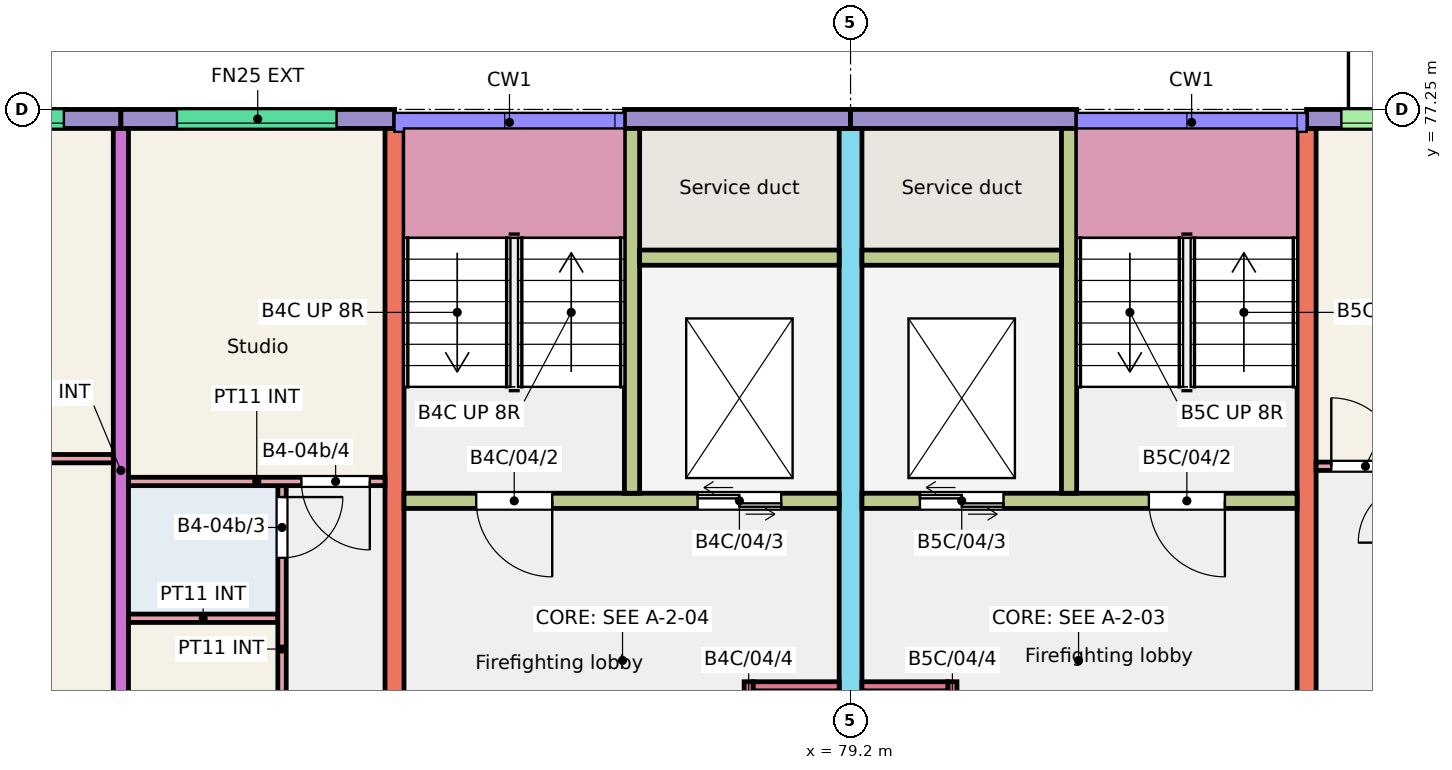
"""IFC4 building model, lengths in metres.
Left out: names, types, materials, properties, quantities, classifications, styles, units other than length and angle.
Written with IfcOpenShell. Run it as: python <this file> out.ifc"""

import sys

from ifc_helpers import new_model, si_unit, direction, frame, frame_2d, origin, place, context, subcontext, project, spatial, rectangle, extrude, element, fill, save


model = new_model("IFC4")
c1 = context("Model", 3, precision=1e-05, world=origin(), true_north=direction((0.0, 1.0)))
c2 = subcontext(c1, "Body", "Model", "MODEL_VIEW")
j1 = project(units=[si_unit("LENGTHUNIT", "METRE"), si_unit("PLANEANGLEUNIT", "RADIAN")], contexts=[c1])
p1 = place(None, origin())
s1 = spatial("IfcSite", under=j1, at=p1, CompositionType="ELEMENT")
p2 = place(p1, origin())
s2 = spatial("IfcBuilding", under=s1, at=p2, CompositionType="ELEMENT")
p3 = place(p2, frame((0.0, 0.0, 12.0)))
s3 = spatial("IfcBuildingStorey", under=s2, at=p3, CompositionType="ELEMENT", Elevation=12.0)
p4 = place(p3, frame((69.6, 68.0, 0.0), z_axis=(0.0, 0.0, 1.0), x_axis=(0.0, 1.0, 0.0)))
e1 = element("IfcWall", 1, at=p4, inside=s3, PredefinedType="SHEAR", context=c2, shape_type="SweptSolid", body=[
    extrude(rectangle(XDim=9.0, YDim=0.2, at=frame_2d((4.5, 0.0))), origin(), (0.0, 0.0, 1.0), 3.0),
])
p5 = place(p3, frame((73.2, 68.0, 0.0), z_axis=(0.0, 0.0, 1.0), x_axis=(0.0, 1.0, 0.0)))
e2 = element("IfcWall", 2, at=p5, inside=s3, PredefinedType="SHEAR", context=c2, shape_type="SweptSolid", body=[
    extrude(rectangle(XDim=9.0, YDim=0.25, at=frame_2d((4.5, 0.0))), origin(), (0.0, 0.0, 1.0), 3.0),
])
p6 = place(p3, frame((79.2, 66.0, 0.0), z_axis=(0.0, 0.0, 1.0), x_axis=(0.0, 1.0, 0.0)))
e3 = element("IfcWall", 3, at=p6, inside=s3, PredefinedType="SHEAR", context=c2, shape_type="SweptSolid", body=[
    extrude(rectangle(XDim=11.0, YDim=0.3, at=frame_2d((5.5, 0.0))), origin(), (0.0, 0.0, 1.0), 3.0),
])
p7 = place(p6, frame((0.3, 0.0, 0.0)))
e4 = element("IfcOpeningElement", 4, at=p7, cuts=e3, PredefinedType="OPENING", context=c2, shape_type="SweptSolid", body=[
    extrude(rectangle(XDim=1.2, YDim=2.1, at=frame_2d((0.6, 1.05))), frame((0.0, 0.16, 0.0), z_axis=(0.0, -1.0, 0.0), x_axis=(1.0, 0.0, 0.0)), (0.0, 0.0, 1.0), 0.32),
])
p8 = place(p3, frame((85.2, 68.0, 0.0), z_axis=(0.0, 0.0, 1.0), x_axis=(0.0, 1.0, 0.0)))
e5 = element("IfcWall", 5, at=p8, inside=s3, PredefinedType="SHEAR", context=c2, shape_type="SweptSolid", body=[
    extrude(rectangle(XDim=9.0, YDim=0.25, at=frame_2d((4.5, 0.0))), origin(), (0.0, 0.0, 1.0), 3.0),
])
p9 = place(p3, frame((66.0, 77.125, 0.0), z_axis=(0.0, 0.0, 1.0), x_axis=(1.0, 0.0, 0.0)))
e6 = element("IfcWall", 6, at=p9, inside=s3, PredefinedType="SOLIDWALL", context=c2, shape_type="SweptSolid", body=[
    extrude(rectangle(XDim=3.6, YDim=0.25, at=frame_2d((1.8, 0.0))), origin(), (0.0, 0.0, 1.0), 3.0),
])
p10 = place(p9, frame((0.75, 0.0, 1.2)))
e7 = element("IfcOpeningElement", 7, at=p10, cuts=e6, PredefinedType="OPENING", context=c2, shape_type="SweptSolid", body=[
    extrude(rectangle(XDim=2.1, YDim=1.2, at=frame_2d((1.05, 0.6))), frame((0.0, 0.135, 0.0), z_axis=(0.0, -1.0, 0.0), x_axis=(1.0, 0.0, 0.0)), (0.0, 0.0, 1.0), 0.27),
])
p11 = place(p3, frame((69.6, 77.125, 0.0), z_axis=(0.0, 0.0, 1.0), x_axis=(1.0, 0.0, 0.0)))
e8 = element("IfcWall", 8, at=p11, inside=s3, PredefinedType="SOLIDWALL", context=c2, shape_type="SweptSolid", body=[
    extrude(rectangle(XDim=3.6, YDim=0.25, at=frame_2d((1.8, 0.0))), origin(), (0.0, 0.0, 1.0), 3.0),
])
p12 = place(p11, frame((0.738, 0.0, 1.2)))
e9 = element("IfcOpeningElement", 9, at=p12, cuts=e8, PredefinedType="OPENING", context=c2, shape_type="SweptSolid", body=[
    extrude(rectangle(XDim=2.1, YDim=1.2, at=frame_2d((1.05, 0.6))), frame((0.0, 0.135, 0.0), z_axis=(0.0, -1.0, 0.0), x_axis=(1.0, 0.0, 0.0)), (0.0, 0.0, 1.0), 0.27),
])
p13 = place(p3, frame((76.225, 77.125, 0.0), z_axis=(0.0, 0.0, 1.0), x_axis=(1.0, 0.0, 0.0)))
e10 = element("IfcWall", 10, at=p13, inside=s3, PredefinedType="SOLIDWALL", context=c2, shape_type="SweptSolid", body=[
    extrude(rectangle(XDim=2.975, YDim=0.25, at=frame_2d((1.487, 0.0))), origin(), (0.0, 0.0, 1.0), 3.0),
])
p14 = place(p3, frame((73.325, 72.1, 0.0), z_axis=(0.0, 0.0, 1.0), x_axis=(1.0, 0.0, 0.0)))
e11 = element("IfcWall", 11, at=p14, inside=s3, PredefinedType="SHEAR", context=c2, shape_type="SweptSolid", body=[
    extrude(rectangle(XDim=5.725, YDim=0.2, at=frame_2d((2.863, 0.0))), origin(), (0.0, 0.0, 1.0), 3.0),
])
p15 = place(p14, frame((0.95, 0.0, 0.0)))
e12 = element("IfcOpeningElement", 12, at=p15, cuts=e11, PredefinedType="OPENING", context=c2, shape_type="SweptSolid", body=[
    extrude(rectangle(XDim=1.0, YDim=2.1, at=frame_2d((0.5, 1.05))), frame((0.0, 0.11, 0.0), z_axis=(0.0, -1.0, 0.0), x_axis=(1.0, 0.0, 0.0)), (0.0, 0.0, 1.0), 0.22),
])
p16 = place(p14, frame((3.863, 0.0, 0.0)))
e13 = element("IfcOpeningElement", 13, at=p16, cuts=e11, PredefinedType="OPENING", context=c2, shape_type="SweptSolid", body=[
    extrude(rectangle(XDim=1.1, YDim=2.1, at=frame_2d((0.55, 1.05))), frame((0.0, 0.11, 0.0), z_axis=(0.0, -1.0, 0.0), x_axis=(1.0, 0.0, 0.0)), (0.0, 0.0, 1.0), 0.22),
])
p17 = place(p3, frame((76.325, 72.2, 0.0), z_axis=(0.0, 0.0, 1.0), x_axis=(0.0, 1.0, 0.0)))
e14 = element("IfcWall", 14, at=p17, inside=s3, PredefinedType="SHEAR", context=c2, shape_type="SweptSolid", body=[
    extrude(rectangle(XDim=4.8, YDim=0.2, at=frame_2d((2.4, 0.0))), origin(), (0.0, 0.0, 1.0), 3.0),
])
p18 = place(p3, frame((76.425, 75.3, 0.0), z_axis=(0.0, 0.0, 1.0), x_axis=(1.0, 0.0, 0.0)))
e15 = element("IfcWall", 15, at=p18, inside=s3, PredefinedType="SHEAR", context=c2, shape_type="SweptSolid", body=[
    extrude(rectangle(XDim=2.625, YDim=0.2, at=frame_2d((1.312, 0.0))), origin(), (0.0, 0.0, 1.0), 3.0),
])
p19 = place(p3, frame((77.86, 68.0, 0.0), z_axis=(0.0, 0.0, 1.0), x_axis=(0.0, 1.0, 0.0)))
e16 = element("IfcWall", 16, at=p19, inside=s3, PredefinedType="SHEAR", context=c2, shape_type="SweptSolid", body=[
    extrude(rectangle(XDim=1.72, YDim=0.12, at=frame_2d((0.86, 0.0))), origin(), (0.0, 0.0, 1.0), 3.0),
])
p20 = place(p19, frame((0.45, 0.0, 0.0)))
e17 = element("IfcOpeningElement", 17, at=p20, cuts=e16, PredefinedType="OPENING", context=c2, shape_type="SweptSolid", body=[
    extrude(rectangle(XDim=0.9, YDim=2.1, at=frame_2d((0.45, 1.05))), frame((0.0, 0.07, 0.0), z_axis=(0.0, -1.0, 0.0), x_axis=(1.0, 0.0, 0.0)), (0.0, 0.0, 1.0), 0.14),
])
p21 = place(p3, frame((77.92, 69.66, 0.0), z_axis=(0.0, 0.0, 1.0), x_axis=(1.0, 0.0, 0.0)))
e18 = element("IfcWall", 18, at=p21, inside=s3, PredefinedType="SHEAR", context=c2, shape_type="SweptSolid", body=[
    extrude(rectangle(XDim=1.13, YDim=0.12, at=frame_2d((0.565, 0.0))), origin(), (0.0, 0.0, 1.0), 3.0),
])
p22 = place(p3, frame((79.2, 77.125, 0.0), z_axis=(0.0, 0.0, 1.0), x_axis=(1.0, 0.0, 0.0)))
e19 = element("IfcWall", 19, at=p22, inside=s3, PredefinedType="SOLIDWALL", context=c2, shape_type="SweptSolid", body=[
    extrude(rectangle(XDim=2.975, YDim=0.25, at=frame_2d((1.488, 0.0))), origin(), (0.0, 0.0, 1.0), 3.0),
])
p23 = place(p3, frame((79.35, 72.1, 0.0), z_axis=(0.0, 0.0, 1.0), x_axis=(1.0, 0.0, 0.0)))
e20 = element("IfcWall", 20, at=p23, inside=s3, PredefinedType="SHEAR", context=c2, shape_type="SweptSolid", body=[
    extrude(rectangle(XDim=5.725, YDim=0.2, at=frame_2d((2.862, 0.0))), origin(), (0.0, 0.0, 1.0), 3.0),
])
p24 = place(p23, frame((3.775, 0.0, 0.0)))
e21 = element("IfcOpeningElement", 21, at=p24, cuts=e20, PredefinedType="OPENING", context=c2, shape_type="SweptSolid", body=[
    extrude(rectangle(XDim=1.0, YDim=2.1, at=frame_2d((0.5, 1.05))), frame((0.0, 0.11, 0.0), z_axis=(0.0, -1.0, 0.0), x_axis=(1.0, 0.0, 0.0)), (0.0, 0.0, 1.0), 0.22),
])
p25 = place(p23, frame((0.762, 0.0, 0.0)))
e22 = element("IfcOpeningElement", 22, at=p25, cuts=e20, PredefinedType="OPENING", context=c2, shape_type="SweptSolid", body=[
    extrude(rectangle(XDim=1.1, YDim=2.1, at=frame_2d((0.55, 1.05))), frame((0.0, 0.11, 0.0), z_axis=(0.0, -1.0, 0.0), x_axis=(1.0, 0.0, 0.0)), (0.0, 0.0, 1.0), 0.22),
])
p26 = place(p3, frame((82.075, 72.2, 0.0), z_axis=(0.0, 0.0, 1.0), x_axis=(0.0, 1.0, 0.0)))
e23 = element("IfcWall", 23, at=p26, inside=s3, PredefinedType="SHEAR", context=c2, shape_type="SweptSolid", body=[
    extrude(rectangle(XDim=4.8, YDim=0.2, at=frame_2d((2.4, 0.0))), origin(), (0.0, 0.0, 1.0), 3.0),
])
p27 = place(p3, frame((79.35, 75.3, 0.0), z_axis=(0.0, 0.0, 1.0), x_axis=(1.0, 0.0, 0.0)))
e24 = element("IfcWall", 24, at=p27, inside=s3, PredefinedType="SHEAR", context=c2, shape_type="SweptSolid", body=[
    extrude(rectangle(XDim=2.625, YDim=0.2, at=frame_2d((1.312, 0.0))), origin(), (0.0, 0.0, 1.0), 3.0),
])
p28 = place(p3, frame((80.54, 68.0, 0.0), z_axis=(0.0, 0.0, 1.0), x_axis=(0.0, 1.0, 0.0)))
e25 = element("IfcWall", 25, at=p28, inside=s3, PredefinedType="SHEAR", context=c2, shape_type="SweptSolid", body=[
    extrude(rectangle(XDim=1.72, YDim=0.12, at=frame_2d((0.86, 0.0))), origin(), (0.0, 0.0, 1.0), 3.0),
])
p29 = place(p28, frame((0.45, 0.0, 0.0)))
e26 = element("IfcOpeningElement", 26, at=p29, cuts=e25, PredefinedType="OPENING", context=c2, shape_type="SweptSolid", body=[
    extrude(rectangle(XDim=0.9, YDim=2.1, at=frame_2d((0.45, 1.05))), frame((0.0, 0.07, 0.0), z_axis=(0.0, -1.0, 0.0), x_axis=(1.0, 0.0, 0.0)), (0.0, 0.0, 1.0), 0.14),
])
p30 = place(p3, frame((79.35, 69.66, 0.0), z_axis=(0.0, 0.0, 1.0), x_axis=(1.0, 0.0, 0.0)))
e27 = element("IfcWall", 27, at=p30, inside=s3, PredefinedType="SHEAR", context=c2, shape_type="SweptSolid", body=[
    extrude(rectangle(XDim=1.13, YDim=0.12, at=frame_2d((0.565, 0.0))), origin(), (0.0, 0.0, 1.0), 3.0),
])
p31 = place(p3, frame((85.2, 77.125, 0.0), z_axis=(0.0, 0.0, 1.0), x_axis=(1.0, 0.0, 0.0)))
e28 = element("IfcWall", 28, at=p31, inside=s3, PredefinedType="SOLIDWALL", context=c2, shape_type="SweptSolid", body=[
    extrude(rectangle(XDim=3.6, YDim=0.25, at=frame_2d((1.8, 0.0))), origin(), (0.0, 0.0, 1.0), 3.0),
])
p32 = place(p31, frame((0.458, 0.0, 1.2)))
e29 = element("IfcOpeningElement", 29, at=p32, cuts=e28, PredefinedType="OPENING", context=c2, shape_type="SweptSolid", body=[
    extrude(rectangle(XDim=1.5, YDim=1.2, at=frame_2d((0.75, 0.6))), frame((0.0, 0.135, 0.0), z_axis=(0.0, -1.0, 0.0), x_axis=(1.0, 0.0, 0.0)), (0.0, 0.0, 1.0), 0.27),
])
p33 = place(p31, frame((2.39, 0.0, 0.0)))
e30 = element("IfcOpeningElement", 30, at=p33, cuts=e28, PredefinedType="OPENING", context=c2, shape_type="SweptSolid", body=[
    extrude(rectangle(XDim=1.0, YDim=2.1, at=frame_2d((0.5, 1.05))), frame((0.0, 0.135, 0.0), z_axis=(0.0, -1.0, 0.0), x_axis=(1.0, 0.0, 0.0)), (0.0, 0.0, 1.0), 0.27),
])
p34 = place(p3, frame((66.1, 72.655, 0.0), z_axis=(0.0, 0.0, 1.0), x_axis=(1.0, 0.0, 0.0)))
e31 = element("IfcWall", 31, at=p34, inside=s3, PredefinedType="PARTITIONING", context=c2, shape_type="SweptSolid", body=[
    extrude(rectangle(XDim=3.4, YDim=0.11, at=frame_2d((1.7, 0.0))), origin(), (0.0, 0.0, 1.0), 2.8),
])
p35 = place(p3, frame((69.7, 70.555, 0.0), z_axis=(0.0, 0.0, 1.0), x_axis=(1.0, 0.0, 0.0)))
e32 = element("IfcWall", 32, at=p35, inside=s3, PredefinedType="PARTITIONING", context=c2, shape_type="SweptSolid", body=[
    extrude(rectangle(XDim=1.965, YDim=0.11, at=frame_2d((0.982, 0.0))), origin(), (0.0, 0.0, 1.0), 2.8),
])
p36 = place(p3, frame((71.72, 68.0, 0.0), z_axis=(0.0, 0.0, 1.0), x_axis=(0.0, 1.0, 0.0)))
e33 = element("IfcWall", 33, at=p36, inside=s3, PredefinedType="PARTITIONING", context=c2, shape_type="SweptSolid", body=[
    extrude(rectangle(XDim=4.3, YDim=0.11, at=frame_2d((2.15, 0.0))), origin(), (0.0, 0.0, 1.0), 2.8),
])
p37 = place(p36, frame((0.2, 0.0, 0.0)))
e34 = element("IfcOpeningElement", 34, at=p37, cuts=e33, PredefinedType="OPENING", context=c2, shape_type="SweptSolid", body=[
    extrude(rectangle(XDim=0.8, YDim=2.1, at=frame_2d((0.4, 1.05))), frame((0.0, 0.065, 0.0), z_axis=(0.0, -1.0, 0.0), x_axis=(1.0, 0.0, 0.0)), (0.0, 0.0, 1.0), 0.13),
])
p38 = place(p36, frame((3.35, 0.0, 0.0)))
e35 = element("IfcOpeningElement", 35, at=p38, cuts=e33, PredefinedType="OPENING", context=c2, shape_type="SweptSolid", body=[
    extrude(rectangle(XDim=0.8, YDim=2.1, at=frame_2d((0.4, 1.05))), frame((0.0, 0.065, 0.0), z_axis=(0.0, -1.0, 0.0), x_axis=(1.0, 0.0, 0.0)), (0.0, 0.0, 1.0), 0.13),
])
p39 = place(p3, frame((69.7, 72.355, 0.0), z_axis=(0.0, 0.0, 1.0), x_axis=(1.0, 0.0, 0.0)))
e36 = element("IfcWall", 36, at=p39, inside=s3, PredefinedType="PARTITIONING", context=c2, shape_type="SweptSolid", body=[
    extrude(rectangle(XDim=3.375, YDim=0.11, at=frame_2d((1.688, 0.0))), origin(), (0.0, 0.0, 1.0), 2.8),
])
p40 = place(p39, frame((2.275, 0.0, 0.0)))
e37 = element("IfcOpeningElement", 37, at=p40, cuts=e36, PredefinedType="OPENING", context=c2, shape_type="SweptSolid", body=[
    extrude(rectangle(XDim=0.9, YDim=2.1, at=frame_2d((0.45, 1.05))), frame((0.0, 0.065, 0.0), z_axis=(0.0, -1.0, 0.0), x_axis=(1.0, 0.0, 0.0)), (0.0, 0.0, 1.0), 0.13),
])
p41 = place(p3, frame((85.325, 72.555, 0.0), z_axis=(0.0, 0.0, 1.0), x_axis=(1.0, 0.0, 0.0)))
e38 = element("IfcWall", 38, at=p41, inside=s3, PredefinedType="PARTITIONING", context=c2, shape_type="SweptSolid", body=[
    extrude(rectangle(XDim=3.375, YDim=0.11, at=frame_2d((1.688, 0.0))), origin(), (0.0, 0.0, 1.0), 2.8),
])
p42 = place(p41, frame((0.2, 0.0, 0.0)))
e39 = element("IfcOpeningElement", 39, at=p42, cuts=e38, PredefinedType="OPENING", context=c2, shape_type="SweptSolid", body=[
    extrude(rectangle(XDim=0.9, YDim=2.1, at=frame_2d((0.45, 1.05))), frame((0.0, 0.065, 0.0), z_axis=(0.0, -1.0, 0.0), x_axis=(1.0, 0.0, 0.0)), (0.0, 0.0, 1.0), 0.13),
])
p43 = place(p10, origin())
e40 = element("IfcWindow", 40, at=p43, inside=s3, PartitioningType="SINGLE_PANEL", PredefinedType="WINDOW", context=c2, shape_type="SweptSolid", body=[
    extrude(rectangle(XDim=2.1, YDim=1.2, at=frame_2d((1.05, 0.6))), frame((0.0, -0.025, 0.0), z_axis=(0.0, -1.0, 0.0), x_axis=(1.0, 0.0, 0.0)), (0.0, 0.0, 1.0), 0.06),
])
fill(e7, e40)
p44 = place(p12, origin())
e41 = element("IfcWindow", 41, at=p44, inside=s3, PartitioningType="SINGLE_PANEL", PredefinedType="WINDOW", context=c2, shape_type="SweptSolid", body=[
    extrude(rectangle(XDim=2.1, YDim=1.2, at=frame_2d((1.05, 0.6))), frame((0.0, -0.025, 0.0), z_axis=(0.0, -1.0, 0.0), x_axis=(1.0, 0.0, 0.0)), (0.0, 0.0, 1.0), 0.06),
])
fill(e9, e41)
p45 = place(p32, origin())
e42 = element("IfcWindow", 42, at=p45, inside=s3, PartitioningType="SINGLE_PANEL", PredefinedType="WINDOW", context=c2, shape_type="SweptSolid", body=[
    extrude(rectangle(XDim=1.5, YDim=1.2, at=frame_2d((0.75, 0.6))), frame((0.0, -0.025, 0.0), z_axis=(0.0, -1.0, 0.0), x_axis=(1.0, 0.0, 0.0)), (0.0, 0.0, 1.0), 0.06),
])
fill(e29, e42)
p46 = place(p38, origin())
e43 = element("IfcDoor", 43, at=p46, inside=s3, OperationType="SINGLE_SWING_RIGHT", PredefinedType="DOOR", context=c2, shape_type="SweptSolid", body=[
    extrude(rectangle(XDim=0.8, YDim=2.1, at=frame_2d((0.4, 1.05))), frame((0.0, 0.025, 0.0), z_axis=(0.0, -1.0, 0.0), x_axis=(1.0, 0.0, 0.0)), (0.0, 0.0, 1.0), 0.05),
])
fill(e35, e43)
p47 = place(p40, origin())
e44 = element("IfcDoor", 44, at=p47, inside=s3, OperationType="SINGLE_SWING_RIGHT", PredefinedType="DOOR", context=c2, shape_type="SweptSolid", body=[
    extrude(rectangle(XDim=0.9, YDim=2.1, at=frame_2d((0.45, 1.05))), frame((0.0, 0.025, 0.0), z_axis=(0.0, -1.0, 0.0), x_axis=(1.0, 0.0, 0.0)), (0.0, 0.0, 1.0), 0.05),
])
fill(e37, e44)
p48 = place(p42, origin())
e45 = element("IfcDoor", 45, at=p48, inside=s3, OperationType="SINGLE_SWING_LEFT", PredefinedType="DOOR", context=c2, shape_type="SweptSolid", body=[
    extrude(rectangle(XDim=0.9, YDim=2.1, at=frame_2d((0.45, 1.05))), frame((0.0, 0.025, 0.0), z_axis=(0.0, -1.0, 0.0), x_axis=(1.0, 0.0, 0.0)), (0.0, 0.0, 1.0), 0.05),
])
fill(e39, e45)
p49 = place(p15, origin())
e46 = element("IfcDoor", 46, at=p49, inside=s3, OperationType="SINGLE_SWING_RIGHT", PredefinedType="DOOR", context=c2, shape_type="SweptSolid", body=[
    extrude(rectangle(XDim=1.0, YDim=2.1, at=frame_2d((0.5, 1.05))), frame((0.0, 0.025, 0.0), z_axis=(0.0, -1.0, 0.0), x_axis=(1.0, 0.0, 0.0)), (0.0, 0.0, 1.0), 0.05),
])
fill(e12, e46)
p50 = place(p16, origin())
e47 = element("IfcDoor", 47, at=p50, inside=s3, OperationType="DOUBLE_DOOR_SLIDING", PredefinedType="DOOR", context=c2, shape_type="SweptSolid", body=[
    extrude(rectangle(XDim=1.1, YDim=2.1, at=frame_2d((0.55, 1.05))), frame((0.0, 0.025, 0.0), z_axis=(0.0, -1.0, 0.0), x_axis=(1.0, 0.0, 0.0)), (0.0, 0.0, 1.0), 0.05),
])
fill(e13, e47)
p51 = place(p24, origin())
e48 = element("IfcDoor", 48, at=p51, inside=s3, OperationType="SINGLE_SWING_RIGHT", PredefinedType="DOOR", context=c2, shape_type="SweptSolid", body=[
    extrude(rectangle(XDim=1.0, YDim=2.1, at=frame_2d((0.5, 1.05))), frame((0.0, 0.025, 0.0), z_axis=(0.0, -1.0, 0.0), x_axis=(1.0, 0.0, 0.0)), (0.0, 0.0, 1.0), 0.05),
])
fill(e21, e48)
p52 = place(p25, origin())
e49 = element("IfcDoor", 49, at=p52, inside=s3, OperationType="DOUBLE_DOOR_SLIDING", PredefinedType="DOOR", context=c2, shape_type="SweptSolid", body=[
    extrude(rectangle(XDim=1.1, YDim=2.1, at=frame_2d((0.55, 1.05))), frame((0.0, 0.025, 0.0), z_axis=(0.0, -1.0, 0.0), x_axis=(1.0, 0.0, 0.0)), (0.0, 0.0, 1.0), 0.05),
])
fill(e22, e49)
save(model, sys.argv[1])
